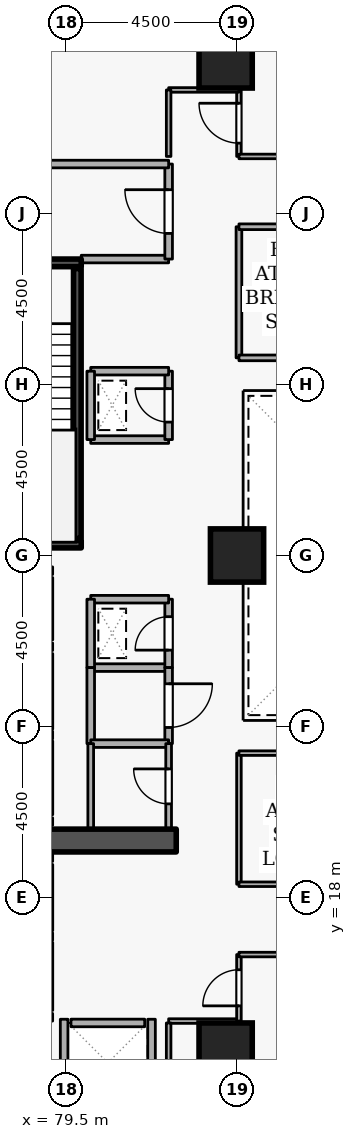
"""IFC4 building model, lengths in metres.
Left out: names, types, materials, properties, quantities, classifications, styles, units other than length and angle.
Written with IfcOpenShell. Run it as: python <this file> out.ifc"""

import sys

from ifc_helpers import new_model, si_unit, direction, frame, frame_2d, origin, origin_2d, place, context, subcontext, project, spatial, rectangle, extrude, element, fill, save


model = new_model("IFC4")
c1 = context("Model", 3, precision=1e-05, world=origin(), true_north=direction((0.0, 1.0)))
c2 = subcontext(c1, "Body", "Model", "MODEL_VIEW")
j1 = project(units=[si_unit("LENGTHUNIT", "METRE"), si_unit("PLANEANGLEUNIT", "RADIAN")], contexts=[c1])
p1 = place(None, origin())
s1 = spatial("IfcSite", under=j1, at=p1, CompositionType="ELEMENT")
p2 = place(p1, origin())
s2 = spatial("IfcBuilding", under=s1, at=p2, CompositionType="ELEMENT")
p3 = place(p2, frame((0.0, 0.0, 68.1)))
s3 = spatial("IfcBuildingStorey", under=s2, at=p3, CompositionType="ELEMENT", Elevation=68.1)
p4 = place(p3, frame((76.7, 19.5, 0.0), z_axis=(0.0, 0.0, 1.0), x_axis=(1.0, 0.0, 0.0)))
e1 = element("IfcWall", 1, at=p4, inside=s3, PredefinedType="SHEAR", context=c2, shape_type="SweptSolid", body=[
    extrude(rectangle(XDim=5.7, YDim=0.6, at=frame_2d((2.85, 0.0))), origin(), (0.0, 0.0, 1.0), 3.6),
])
for number, where, z_axis, x_axis in (
    (2, (83.7, 14.0, 0.0), (0.0, 0.0, 1.0), (1.0, 0.0, 0.0)),
    (3, (83.7, 40.0, 0.0), (0.0, 0.0, 1.0), (1.0, 0.0, 0.0)),
    (4, (84.0, 27.0, 0.0), (0.0, 0.0, 1.0), (1.0, 0.0, 0.0)),
):
    element("IfcColumn", number, at=place(p3, frame(where, z_axis=z_axis, x_axis=x_axis)), inside=s3, PredefinedType="COLUMN", context=c2, shape_type="SweptSolid", body=[
        extrude(rectangle(XDim=1.4, YDim=1.4, at=origin_2d()), origin(), (0.0, 0.0, 1.0), 3.6),
    ])
p5 = place(p3, frame((79.05, 24.78, 0.0), z_axis=(0.0, 0.0, 1.0), x_axis=(0.0, 1.0, 0.0)))
e5 = element("IfcWall", 5, at=p5, inside=s3, PredefinedType="STANDARD", context=c2, shape_type="SweptSolid", body=[
    extrude(rectangle(XDim=1.64, YDim=0.2, at=frame_2d((0.82, 0.0))), origin(), (0.0, 0.0, 1.0), 3.26),
])
p6 = place(p5, frame((0.31, 0.0, 0.0)))
e6 = element("IfcOpeningElement", 6, at=p6, cuts=e5, PredefinedType="OPENING", context=c2, shape_type="SweptSolid", body=[
    extrude(rectangle(XDim=1.02, YDim=2.06, at=frame_2d((0.51, 1.03))), frame((0.0, 0.11, 0.0), z_axis=(0.0, -1.0, 0.0), x_axis=(1.0, 0.0, 0.0)), (0.0, 0.0, 1.0), 0.22),
])
p7 = place(p3, frame((79.05, 22.43, 0.0), z_axis=(0.0, 0.0, 1.0), x_axis=(0.0, 1.0, 0.0)))
e7 = element("IfcWall", 7, at=p7, inside=s3, PredefinedType="STANDARD", context=c2, shape_type="SweptSolid", body=[
    extrude(rectangle(XDim=1.99, YDim=0.2, at=frame_2d((0.995, 0.0))), origin(), (0.0, 0.0, 1.0), 3.26),
])
p8 = place(p3, frame((79.05, 20.18, 0.0), z_axis=(0.0, 0.0, 1.0), x_axis=(0.0, 1.0, 0.0)))
e8 = element("IfcWall", 8, at=p8, inside=s3, PredefinedType="STANDARD", context=c2, shape_type="SweptSolid", body=[
    extrude(rectangle(XDim=1.94, YDim=0.2, at=frame_2d((0.97, 0.0))), origin(), (0.0, 0.0, 1.0), 3.26),
])
p9 = place(p3, frame((79.05, 17.13, 0.0), z_axis=(0.0, 0.0, 1.0), x_axis=(0.0, 1.0, 0.0)))
e9 = element("IfcWall", 9, at=p9, inside=s3, PredefinedType="STANDARD", context=c2, shape_type="SweptSolid", body=[
    extrude(rectangle(XDim=1.74, YDim=0.2, at=frame_2d((0.87, 0.0))), origin(), (0.0, 0.0, 1.0), 3.26),
])
p10 = place(p3, frame((79.05, 15.03, 0.0), z_axis=(0.0, 0.0, 1.0), x_axis=(0.0, 1.0, 0.0)))
e10 = element("IfcWall", 10, at=p10, inside=s3, PredefinedType="STANDARD", context=c2, shape_type="SweptSolid", body=[
    extrude(rectangle(XDim=1.79, YDim=0.2, at=frame_2d((0.895, 0.0))), origin(), (0.0, 0.0, 1.0), 3.26),
])
p11 = place(p3, frame((79.63, 14.7, 0.0), z_axis=(0.0, 0.0, 1.0), x_axis=(1.0, 0.0, 0.0)))
e11 = element("IfcWall", 11, at=p11, inside=s3, PredefinedType="STANDARD", context=c2, shape_type="SweptSolid", body=[
    extrude(rectangle(XDim=1.94, YDim=0.2, at=frame_2d((0.97, 0.0))), origin(), (0.0, 0.0, 1.0), 3.26),
])
for number, where, z_axis, x_axis in (
    (12, (81.75, 12.612, 0.0), (0.0, 0.0, 1.0), (0.0, 1.0, 0.0)),
    (13, (79.45, 12.612, 0.0), (0.0, 0.0, 1.0), (0.0, 1.0, 0.0)),
):
    element("IfcWall", number, at=place(p3, frame(where, z_axis=z_axis, x_axis=x_axis)), inside=s3, PredefinedType="STANDARD", context=c2, shape_type="SweptSolid", body=[
        extrude(rectangle(XDim=2.186, YDim=0.2, at=frame_2d((1.093, 0.0))), origin(), (0.0, 0.0, 1.0), 3.26),
    ])
p12 = place(p3, frame((76.55, 34.7, 0.0), z_axis=(0.0, 0.0, 1.0), x_axis=(1.0, 0.0, 0.0)))
e14 = element("IfcWall", 14, at=p12, inside=s3, PredefinedType="SHEAR", context=c2, shape_type="SweptSolid", body=[
    extrude(rectangle(XDim=3.35, YDim=0.2, at=frame_2d((1.675, 0.0))), origin(), (0.0, 0.0, 1.0), 3.6),
])
p13 = place(p12, frame((1.125, 0.0, 0.0)))
e15 = element("IfcOpeningElement", 15, at=p13, cuts=e14, PredefinedType="OPENING", context=c2, shape_type="SweptSolid", body=[
    extrude(rectangle(XDim=1.1, YDim=2.1, at=frame_2d((0.55, 1.05))), frame((0.0, 0.11, 0.0), z_axis=(0.0, -1.0, 0.0), x_axis=(1.0, 0.0, 0.0)), (0.0, 0.0, 1.0), 0.22),
])
p14 = place(p3, frame((79.9, 27.3, 0.0), z_axis=(0.0, 0.0, 1.0), x_axis=(-1.0, 0.0, 0.0)))
e16 = element("IfcWall", 16, at=p14, inside=s3, PredefinedType="SHEAR", context=c2, shape_type="SweptSolid", body=[
    extrude(rectangle(XDim=3.35, YDim=0.2, at=frame_2d((1.675, 0.0))), origin(), (0.0, 0.0, 1.0), 3.6),
])
p15 = place(p3, frame((79.797, 27.45, 0.0), z_axis=(0.0, 0.0, 1.0), x_axis=(0.0, 1.0, 0.0)))
e17 = element("IfcWall", 17, at=p15, inside=s3, PredefinedType="SHEAR", context=c2, shape_type="SweptSolid", body=[
    extrude(rectangle(XDim=7.1, YDim=0.2, at=frame_2d((3.55, 0.0))), origin(), (0.0, 0.0, 1.0), 3.6),
])
p16 = place(p3, frame((79.9, 34.8, 0.0), z_axis=(0.0, 0.0, 1.0), x_axis=(1.0, 0.0, 0.0)))
e18 = element("IfcWall", 18, at=p16, inside=s3, PredefinedType="STANDARD", context=c2, shape_type="SweptSolid", body=[
    extrude(rectangle(XDim=2.3, YDim=0.2, at=frame_2d((1.15, 0.0))), origin(), (0.0, 0.0, 1.0), 2.465),
])
p17 = place(p3, frame((82.2, 34.8, 0.0), z_axis=(0.0, 0.0, 1.0), x_axis=(0.0, 1.0, 0.0)))
e19 = element("IfcWall", 19, at=p17, inside=s3, PredefinedType="STANDARD", context=c2, shape_type="SweptSolid", body=[
    extrude(rectangle(XDim=2.5, YDim=0.2, at=frame_2d((1.25, 0.0))), origin(), (0.0, 0.0, 1.0), 3.26),
])
p18 = place(p17, frame((0.675, 0.0, 0.0)))
e20 = element("IfcOpeningElement", 20, at=p18, cuts=e19, PredefinedType="OPENING", context=c2, shape_type="SweptSolid", body=[
    extrude(rectangle(XDim=1.15, YDim=2.1, at=frame_2d((0.575, 1.05))), frame((0.0, 0.11, 0.0), z_axis=(0.0, -1.0, 0.0), x_axis=(1.0, 0.0, 0.0)), (0.0, 0.0, 1.0), 0.22),
])
p19 = place(p3, frame((82.2, 37.3, 0.0), z_axis=(0.0, 0.0, 1.0), x_axis=(-1.0, 0.0, 0.0)))
e21 = element("IfcWall", 21, at=p19, inside=s3, PredefinedType="STANDARD", context=c2, shape_type="SweptSolid", body=[
    extrude(rectangle(XDim=5.7, YDim=0.2, at=frame_2d((2.85, 0.0))), origin(), (0.0, 0.0, 1.0), 3.26),
])
p20 = place(p3, frame((80.15, 24.05, 0.0), z_axis=(0.0, 0.0, 1.0), x_axis=(1.0, 0.0, 0.0)))
e22 = element("IfcWall", 22, at=p20, inside=s3, PredefinedType="STANDARD", context=c2, shape_type="SweptSolid", body=[
    extrude(rectangle(XDim=2.05, YDim=0.2, at=frame_2d((1.025, 0.0))), origin(), (0.0, 0.0, 1.0), 3.26),
])
p21 = place(p3, frame((82.2, 24.05, 0.0), z_axis=(0.0, 0.0, 1.0), x_axis=(0.0, 1.0, 0.0)))
e23 = element("IfcWall", 23, at=p21, inside=s3, PredefinedType="STANDARD", context=c2, shape_type="SweptSolid", body=[
    extrude(rectangle(XDim=1.8, YDim=0.2, at=frame_2d((0.9, 0.0))), origin(), (0.0, 0.0, 1.0), 3.26),
])
p22 = place(p21, frame((0.46, 0.0, 0.0)))
e24 = element("IfcOpeningElement", 24, at=p22, cuts=e23, PredefinedType="OPENING", context=c2, shape_type="SweptSolid", body=[
    extrude(rectangle(XDim=0.88, YDim=2.04, at=frame_2d((0.44, 1.02))), frame((0.0, 0.11, 0.0), z_axis=(0.0, -1.0, 0.0), x_axis=(1.0, 0.0, 0.0)), (0.0, 0.0, 1.0), 0.22),
])
p23 = place(p3, frame((82.2, 25.85, 0.0), z_axis=(0.0, 0.0, 1.0), x_axis=(-1.0, 0.0, 0.0)))
e25 = element("IfcWall", 25, at=p23, inside=s3, PredefinedType="STANDARD", context=c2, shape_type="SweptSolid", body=[
    extrude(rectangle(XDim=2.05, YDim=0.2, at=frame_2d((1.025, 0.0))), origin(), (0.0, 0.0, 1.0), 3.26),
])
p24 = place(p3, frame((80.15, 25.85, 0.0), z_axis=(0.0, 0.0, 1.0), x_axis=(0.0, -1.0, 0.0)))
e26 = element("IfcWall", 26, at=p24, inside=s3, PredefinedType="STANDARD", context=c2, shape_type="SweptSolid", body=[
    extrude(rectangle(XDim=1.8, YDim=0.2, at=frame_2d((0.9, 0.0))), origin(), (0.0, 0.0, 1.0), 3.26),
])
p25 = place(p3, frame((80.15, 30.05, 0.0), z_axis=(0.0, 0.0, 1.0), x_axis=(1.0, 0.0, 0.0)))
e27 = element("IfcWall", 27, at=p25, inside=s3, PredefinedType="STANDARD", context=c2, shape_type="SweptSolid", body=[
    extrude(rectangle(XDim=2.05, YDim=0.2, at=frame_2d((1.025, 0.0))), origin(), (0.0, 0.0, 1.0), 3.26),
])
p26 = place(p3, frame((82.2, 30.05, 0.0), z_axis=(0.0, 0.0, 1.0), x_axis=(0.0, 1.0, 0.0)))
e28 = element("IfcWall", 28, at=p26, inside=s3, PredefinedType="STANDARD", context=c2, shape_type="SweptSolid", body=[
    extrude(rectangle(XDim=1.8, YDim=0.2, at=frame_2d((0.9, 0.0))), origin(), (0.0, 0.0, 1.0), 3.26),
])
p27 = place(p26, frame((0.46, 0.0, 0.0)))
e29 = element("IfcOpeningElement", 29, at=p27, cuts=e28, PredefinedType="OPENING", context=c2, shape_type="SweptSolid", body=[
    extrude(rectangle(XDim=0.88, YDim=2.04, at=frame_2d((0.44, 1.02))), frame((0.0, 0.11, 0.0), z_axis=(0.0, -1.0, 0.0), x_axis=(1.0, 0.0, 0.0)), (0.0, 0.0, 1.0), 0.22),
])
p28 = place(p3, frame((82.2, 31.85, 0.0), z_axis=(0.0, 0.0, 1.0), x_axis=(-1.0, 0.0, 0.0)))
e30 = element("IfcWall", 30, at=p28, inside=s3, PredefinedType="STANDARD", context=c2, shape_type="SweptSolid", body=[
    extrude(rectangle(XDim=2.05, YDim=0.2, at=frame_2d((1.025, 0.0))), origin(), (0.0, 0.0, 1.0), 3.26),
])
p29 = place(p3, frame((80.15, 31.85, 0.0), z_axis=(0.0, 0.0, 1.0), x_axis=(0.0, -1.0, 0.0)))
e31 = element("IfcWall", 31, at=p29, inside=s3, PredefinedType="STANDARD", context=c2, shape_type="SweptSolid", body=[
    extrude(rectangle(XDim=1.8, YDim=0.2, at=frame_2d((0.9, 0.0))), origin(), (0.0, 0.0, 1.0), 3.26),
])
p30 = place(p3, frame((80.15, 22.05, 0.0), z_axis=(0.0, 0.0, 1.0), x_axis=(0.0, 1.0, 0.0)))
e32 = element("IfcWall", 32, at=p30, inside=s3, PredefinedType="STANDARD", context=c2, shape_type="SweptSolid", body=[
    extrude(rectangle(XDim=2.0, YDim=0.2, at=frame_2d((1.0, 0.0))), origin(), (0.0, 0.0, 1.0), 3.26),
])
p31 = place(p3, frame((82.2, 24.05, 0.0), z_axis=(0.0, 0.0, 1.0), x_axis=(0.0, -1.0, 0.0)))
e33 = element("IfcWall", 33, at=p31, inside=s3, PredefinedType="STANDARD", context=c2, shape_type="SweptSolid", body=[
    extrude(rectangle(XDim=2.0, YDim=0.2, at=frame_2d((1.0, 0.0))), origin(), (0.0, 0.0, 1.0), 3.26),
])
p32 = place(p31, frame((0.425, 0.0, 0.0)))
e34 = element("IfcOpeningElement", 34, at=p32, cuts=e33, PredefinedType="OPENING", context=c2, shape_type="SweptSolid", body=[
    extrude(rectangle(XDim=1.15, YDim=2.1, at=frame_2d((0.575, 1.05))), frame((0.0, 0.11, 0.0), z_axis=(0.0, -1.0, 0.0), x_axis=(1.0, 0.0, 0.0)), (0.0, 0.0, 1.0), 0.22),
])
p33 = place(p3, frame((82.2, 22.05, 0.0), z_axis=(0.0, 0.0, 1.0), x_axis=(-1.0, 0.0, 0.0)))
e35 = element("IfcWall", 35, at=p33, inside=s3, PredefinedType="STANDARD", context=c2, shape_type="SweptSolid", body=[
    extrude(rectangle(XDim=2.05, YDim=0.2, at=frame_2d((1.025, 0.0))), origin(), (0.0, 0.0, 1.0), 3.26),
])
p34 = place(p3, frame((82.2, 19.8, 0.0), z_axis=(0.0, 0.0, 1.0), x_axis=(0.0, 1.0, 0.0)))
e36 = element("IfcWall", 36, at=p34, inside=s3, PredefinedType="PARTITIONING", context=c2, shape_type="SweptSolid", body=[
    extrude(rectangle(XDim=2.25, YDim=0.15, at=frame_2d((1.125, 0.0))), origin(), (0.0, 0.0, 1.0), 3.26),
])
p35 = place(p34, frame((0.665, 0.0, 0.0)))
e37 = element("IfcOpeningElement", 37, at=p35, cuts=e36, PredefinedType="OPENING", context=c2, shape_type="SweptSolid", body=[
    extrude(rectangle(XDim=0.92, YDim=2.08, at=frame_2d((0.46, 1.04))), frame((0.0, 0.085, 0.0), z_axis=(0.0, -1.0, 0.0), x_axis=(1.0, 0.0, 0.0)), (0.0, 0.0, 1.0), 0.17),
])
p36 = place(p3, frame((80.15, 22.05, 0.0), z_axis=(0.0, 0.0, 1.0), x_axis=(0.0, -1.0, 0.0)))
e38 = element("IfcWall", 38, at=p36, inside=s3, PredefinedType="PARTITIONING", context=c2, shape_type="SweptSolid", body=[
    extrude(rectangle(XDim=2.25, YDim=0.15, at=frame_2d((1.125, 0.0))), origin(), (0.0, 0.0, 1.0), 3.26),
])
p37 = place(p3, frame((82.2, 14.75, 0.0), z_axis=(0.0, 0.0, 1.0), x_axis=(1.0, 0.0, 0.0)))
e39 = element("IfcWall", 39, at=p37, inside=s3, PredefinedType="PARTITIONING", context=c2, shape_type="SweptSolid", body=[
    extrude(rectangle(XDim=1.85, YDim=0.12, at=frame_2d((0.925, 0.0))), origin(), (0.0, 0.0, 1.0), 3.26),
])
p38 = place(p3, frame((84.05, 14.75, 0.0), z_axis=(0.0, 0.0, 1.0), x_axis=(0.0, 1.0, 0.0)))
e40 = element("IfcWall", 40, at=p38, inside=s3, PredefinedType="PARTITIONING", context=c2, shape_type="SweptSolid", body=[
    extrude(rectangle(XDim=1.75, YDim=0.12, at=frame_2d((0.875, 0.0))), origin(), (0.0, 0.0, 1.0), 3.26),
])
p39 = place(p38, frame((0.4, 0.0, 0.0)))
e41 = element("IfcOpeningElement", 41, at=p39, cuts=e40, PredefinedType="OPENING", context=c2, shape_type="SweptSolid", body=[
    extrude(rectangle(XDim=0.95, YDim=2.1, at=frame_2d((0.475, 1.05))), frame((0.0, 0.07, 0.0), z_axis=(0.0, -1.0, 0.0), x_axis=(1.0, 0.0, 0.0)), (0.0, 0.0, 1.0), 0.14),
])
p40 = place(p3, frame((84.05, 16.5, 0.0), z_axis=(0.0, 0.0, 1.0), x_axis=(1.0, 0.0, 0.0)))
e42 = element("IfcWall", 42, at=p40, inside=s3, PredefinedType="PARTITIONING", context=c2, shape_type="SweptSolid", body=[
    extrude(rectangle(XDim=1.3, YDim=0.12, at=frame_2d((0.65, 0.0))), origin(), (0.0, 0.0, 1.0), 3.26),
])
p41 = place(p3, frame((82.2, 12.4, 0.0), z_axis=(0.0, 0.0, 1.0), x_axis=(0.0, 1.0, 0.0)))
e43 = element("IfcWall", 43, at=p41, inside=s3, PredefinedType="PARTITIONING", context=c2, shape_type="SweptSolid", body=[
    extrude(rectangle(XDim=2.3, YDim=0.12, at=frame_2d((1.15, 0.0))), origin(), (0.0, 0.0, 1.0), 3.26),
])
p42 = place(p3, frame((84.05, 37.5, 0.0), z_axis=(0.0, 0.0, 1.0), x_axis=(0.0, 1.0, 0.0)))
e44 = element("IfcWall", 44, at=p42, inside=s3, PredefinedType="PARTITIONING", context=c2, shape_type="SweptSolid", body=[
    extrude(rectangle(XDim=1.75, YDim=0.12, at=frame_2d((0.875, 0.0))), origin(), (0.0, 0.0, 1.0), 3.26),
])
p43 = place(p42, frame((0.35, 0.0, 0.0)))
e45 = element("IfcOpeningElement", 45, at=p43, cuts=e44, PredefinedType="OPENING", context=c2, shape_type="SweptSolid", body=[
    extrude(rectangle(XDim=1.05, YDim=2.1, at=frame_2d((0.525, 1.05))), frame((0.0, 0.07, 0.0), z_axis=(0.0, -1.0, 0.0), x_axis=(1.0, 0.0, 0.0)), (0.0, 0.0, 1.0), 0.14),
])
p44 = place(p3, frame((84.05, 39.25, 0.0), z_axis=(0.0, 0.0, 1.0), x_axis=(-1.0, 0.0, 0.0)))
e46 = element("IfcWall", 46, at=p44, inside=s3, PredefinedType="PARTITIONING", context=c2, shape_type="SweptSolid", body=[
    extrude(rectangle(XDim=1.85, YDim=0.12, at=frame_2d((0.925, 0.0))), origin(), (0.0, 0.0, 1.0), 3.26),
])
p45 = place(p3, frame((82.2, 39.25, 0.0), z_axis=(0.0, 0.0, 1.0), x_axis=(0.0, -1.0, 0.0)))
e47 = element("IfcWall", 47, at=p45, inside=s3, PredefinedType="PARTITIONING", context=c2, shape_type="SweptSolid", body=[
    extrude(rectangle(XDim=1.75, YDim=0.12, at=frame_2d((0.875, 0.0))), origin(), (0.0, 0.0, 1.0), 3.26),
])
p46 = place(p3, frame((85.35, 37.5, 0.0), z_axis=(0.0, 0.0, 1.0), x_axis=(-1.0, 0.0, 0.0)))
e48 = element("IfcWall", 48, at=p46, inside=s3, PredefinedType="PARTITIONING", context=c2, shape_type="SweptSolid", body=[
    extrude(rectangle(XDim=1.3, YDim=0.12, at=frame_2d((0.65, 0.0))), origin(), (0.0, 0.0, 1.0), 3.26),
])
p47 = place(p3, frame((84.05, 32.2, 0.0), z_axis=(0.0, 0.0, 1.0), x_axis=(0.0, 1.0, 0.0)))
e49 = element("IfcWall", 49, at=p47, inside=s3, PredefinedType="PARTITIONING", context=c2, shape_type="SweptSolid", body=[
    extrude(rectangle(XDim=3.45, YDim=0.15, at=frame_2d((1.725, 0.0))), origin(), (0.0, 0.0, 1.0), 3.26),
])
p48 = place(p3, frame((84.05, 35.65, 0.0), z_axis=(0.0, 0.0, 1.0), x_axis=(1.0, 0.0, 0.0)))
e50 = element("IfcWall", 50, at=p48, inside=s3, PredefinedType="PARTITIONING", context=c2, shape_type="SweptSolid", body=[
    extrude(rectangle(XDim=8.9, YDim=0.15, at=frame_2d((4.45, 0.0))), origin(), (0.0, 0.0, 1.0), 3.26),
])
p49 = place(p48, frame((3.8, 0.0, 0.0)))
e51 = element("IfcOpeningElement", 51, at=p49, cuts=e50, PredefinedType="OPENING", context=c2, shape_type="SweptSolid", body=[
    extrude(rectangle(XDim=1.3, YDim=2.12, at=frame_2d((0.65, 1.06))), frame((0.0, 0.085, 0.0), z_axis=(0.0, -1.0, 0.0), x_axis=(1.0, 0.0, 0.0)), (0.0, 0.0, 1.0), 0.17),
])
p50 = place(p3, frame((92.95, 32.2, 0.0), z_axis=(0.0, 0.0, 1.0), x_axis=(-1.0, 0.0, 0.0)))
e52 = element("IfcWall", 52, at=p50, inside=s3, PredefinedType="PARTITIONING", context=c2, shape_type="SweptSolid", body=[
    extrude(rectangle(XDim=8.9, YDim=0.15, at=frame_2d((4.45, 0.0))), origin(), (0.0, 0.0, 1.0), 3.26),
])
p51 = place(p3, frame((84.05, 18.35, 0.0), z_axis=(0.0, 0.0, 1.0), x_axis=(0.0, 1.0, 0.0)))
e53 = element("IfcWall", 53, at=p51, inside=s3, PredefinedType="PARTITIONING", context=c2, shape_type="SweptSolid", body=[
    extrude(rectangle(XDim=3.45, YDim=0.12, at=frame_2d((1.725, 0.0))), origin(), (0.0, 0.0, 1.0), 3.26),
])
p52 = place(p3, frame((84.05, 21.8, 0.0), z_axis=(0.0, 0.0, 1.0), x_axis=(1.0, 0.0, 0.0)))
e54 = element("IfcWall", 54, at=p52, inside=s3, PredefinedType="PARTITIONING", context=c2, shape_type="SweptSolid", body=[
    extrude(rectangle(XDim=8.9, YDim=0.12, at=frame_2d((4.45, 0.0))), origin(), (0.0, 0.0, 1.0), 3.26),
])
p53 = place(p3, frame((92.95, 18.35, 0.0), z_axis=(0.0, 0.0, 1.0), x_axis=(-1.0, 0.0, 0.0)))
e55 = element("IfcWall", 55, at=p53, inside=s3, PredefinedType="PARTITIONING", context=c2, shape_type="SweptSolid", body=[
    extrude(rectangle(XDim=8.9, YDim=0.12, at=frame_2d((4.45, 0.0))), origin(), (0.0, 0.0, 1.0), 3.26),
])
p54 = place(p53, frame((3.975, 0.0, 0.0)))
e56 = element("IfcOpeningElement", 56, at=p54, cuts=e55, PredefinedType="OPENING", context=c2, shape_type="SweptSolid", body=[
    extrude(rectangle(XDim=0.95, YDim=2.1, at=frame_2d((0.475, 1.05))), frame((0.0, 0.07, 0.0), z_axis=(0.0, -1.0, 0.0), x_axis=(1.0, 0.0, 0.0)), (0.0, 0.0, 1.0), 0.14),
])
p55 = place(p18, origin())
e57 = element("IfcDoor", 57, at=p55, inside=s3, OperationType="SINGLE_SWING_RIGHT", PredefinedType="DOOR", context=c2, shape_type="SweptSolid", body=[
    extrude(rectangle(XDim=1.15, YDim=2.1, at=frame_2d((0.575, 1.05))), frame((0.0, 0.025, 0.0), z_axis=(0.0, -1.0, 0.0), x_axis=(1.0, 0.0, 0.0)), (0.0, 0.0, 1.0), 0.05),
])
fill(e20, e57)
p56 = place(p22, origin())
e58 = element("IfcDoor", 58, at=p56, inside=s3, OperationType="SINGLE_SWING_LEFT", PredefinedType="DOOR", context=c2, shape_type="SweptSolid", body=[
    extrude(rectangle(XDim=0.88, YDim=2.04, at=frame_2d((0.44, 1.02))), frame((0.0, 0.025, 0.0), z_axis=(0.0, -1.0, 0.0), x_axis=(1.0, 0.0, 0.0)), (0.0, 0.0, 1.0), 0.05),
])
fill(e24, e58)
p57 = place(p27, origin())
e59 = element("IfcDoor", 59, at=p57, inside=s3, OperationType="SINGLE_SWING_RIGHT", PredefinedType="DOOR", context=c2, shape_type="SweptSolid", body=[
    extrude(rectangle(XDim=0.88, YDim=2.04, at=frame_2d((0.44, 1.02))), frame((0.0, 0.025, 0.0), z_axis=(0.0, -1.0, 0.0), x_axis=(1.0, 0.0, 0.0)), (0.0, 0.0, 1.0), 0.05),
])
fill(e29, e59)
p58 = place(p35, origin())
e60 = element("IfcDoor", 60, at=p58, inside=s3, OperationType="SINGLE_SWING_RIGHT", PredefinedType="DOOR", context=c2, shape_type="SweptSolid", body=[
    extrude(rectangle(XDim=0.92, YDim=2.08, at=frame_2d((0.46, 1.04))), frame((0.0, 0.025, 0.0), z_axis=(0.0, -1.0, 0.0), x_axis=(1.0, 0.0, 0.0)), (0.0, 0.0, 1.0), 0.05),
])
fill(e37, e60)
p59 = place(p32, origin())
e61 = element("IfcDoor", 61, at=p59, inside=s3, OperationType="SINGLE_SWING_LEFT", PredefinedType="DOOR", context=c2, shape_type="SweptSolid", body=[
    extrude(rectangle(XDim=1.15, YDim=2.1, at=frame_2d((0.575, 1.05))), frame((0.0, 0.025, 0.0), z_axis=(0.0, -1.0, 0.0), x_axis=(1.0, 0.0, 0.0)), (0.0, 0.0, 1.0), 0.05),
])
fill(e34, e61)
p60 = place(p39, origin())
e62 = element("IfcDoor", 62, at=p60, inside=s3, OperationType="SINGLE_SWING_LEFT", PredefinedType="DOOR", context=c2, shape_type="SweptSolid", body=[
    extrude(rectangle(XDim=0.95, YDim=2.1, at=frame_2d((0.475, 1.05))), frame((0.0, 0.025, 0.0), z_axis=(0.0, -1.0, 0.0), x_axis=(1.0, 0.0, 0.0)), (0.0, 0.0, 1.0), 0.05),
])
fill(e41, e62)
p61 = place(p43, origin())
e63 = element("IfcDoor", 63, at=p61, inside=s3, OperationType="SINGLE_SWING_RIGHT", PredefinedType="DOOR", context=c2, shape_type="SweptSolid", body=[
    extrude(rectangle(XDim=1.05, YDim=2.1, at=frame_2d((0.525, 1.05))), frame((0.0, 0.025, 0.0), z_axis=(0.0, -1.0, 0.0), x_axis=(1.0, 0.0, 0.0)), (0.0, 0.0, 1.0), 0.05),
])
fill(e45, e63)
save(model, sys.argv[1])
